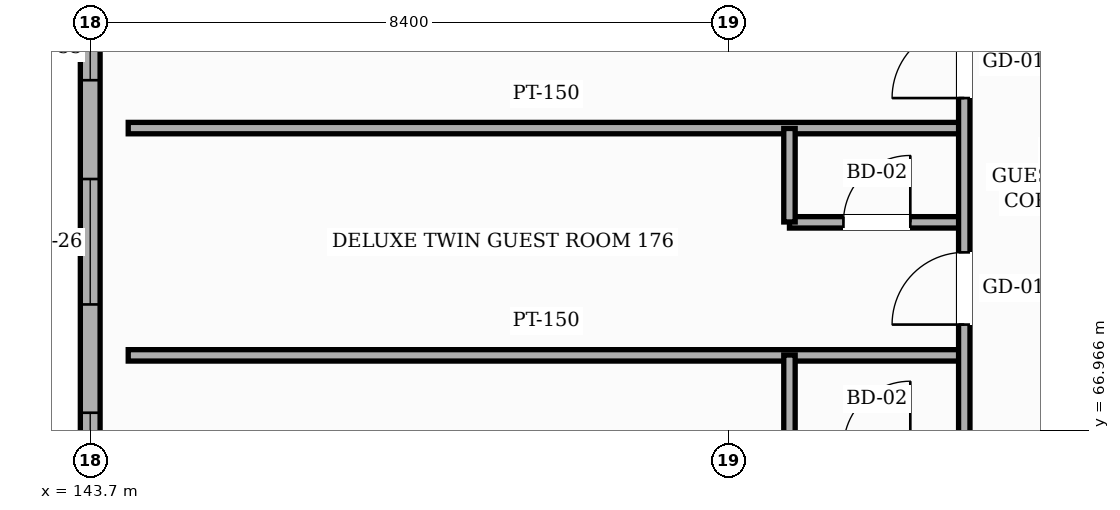
"""IFC4 building model, lengths in metres.
Left out: names, types, materials, properties, quantities, classifications, styles, units other than length and angle.
Written with IfcOpenShell. Run it as: python <this file> out.ifc"""

import sys

from ifc_helpers import new_model, si_unit, direction, frame, frame_2d, origin, place, context, subcontext, project, spatial, rectangle, extrude, element, fill, save


model = new_model("IFC4")
c1 = context("Model", 3, precision=1e-05, world=origin(), true_north=direction((0.0, 1.0)))
c2 = subcontext(c1, "Body", "Model", "MODEL_VIEW")
j1 = project(units=[si_unit("LENGTHUNIT", "METRE"), si_unit("PLANEANGLEUNIT", "RADIAN")], contexts=[c1])
p1 = place(None, origin())
s1 = spatial("IfcSite", under=j1, at=p1, CompositionType="ELEMENT")
p2 = place(p1, origin())
s2 = spatial("IfcBuilding", under=s1, at=p2, CompositionType="ELEMENT")
p3 = place(p2, frame((0.0, 0.0, 31.8)))
s3 = spatial("IfcBuildingStorey", under=s2, at=p3, CompositionType="ELEMENT", Elevation=31.8)
p4 = place(p3, frame((143.7, 64.75, 0.0), z_axis=(0.0, 0.0, 1.0), x_axis=(0.0, 1.0, 0.0)))
e1 = element("IfcWall", 1, at=p4, inside=s3, PredefinedType="SOLIDWALL", context=c2, shape_type="SweptSolid", body=[
    extrude(rectangle(XDim=8.3, YDim=0.26, at=frame_2d((4.15, 0.0))), origin(), (0.0, 0.0, 1.0), 2.655),
])
p5 = place(p4, frame((0.995, 0.0, 0.85)))
e2 = element("IfcOpeningElement", 2, at=p5, cuts=e1, PredefinedType="OPENING", context=c2, shape_type="SweptSolid", body=[
    extrude(rectangle(XDim=1.45, YDim=1.35, at=frame_2d((0.725, 0.675))), frame((0.0, 0.14, 0.0), z_axis=(0.0, -1.0, 0.0), x_axis=(1.0, 0.0, 0.0)), (0.0, 0.0, 1.0), 0.28),
])
p6 = place(p4, frame((3.87, 0.0, 0.85)))
e3 = element("IfcOpeningElement", 3, at=p6, cuts=e1, PredefinedType="OPENING", context=c2, shape_type="SweptSolid", body=[
    extrude(rectangle(XDim=1.65, YDim=1.35, at=frame_2d((0.825, 0.675))), frame((0.0, 0.14, 0.0), z_axis=(0.0, -1.0, 0.0), x_axis=(1.0, 0.0, 0.0)), (0.0, 0.0, 1.0), 0.28),
])
p7 = place(p4, frame((6.82, 0.0, 0.85)))
e4 = element("IfcOpeningElement", 4, at=p7, cuts=e1, PredefinedType="OPENING", context=c2, shape_type="SweptSolid", body=[
    extrude(rectangle(XDim=0.85, YDim=1.35, at=frame_2d((0.425, 0.675))), frame((0.0, 0.14, 0.0), z_axis=(0.0, -1.0, 0.0), x_axis=(1.0, 0.0, 0.0)), (0.0, 0.0, 1.0), 0.28),
])
p8 = place(p3, frame((144.2, 67.95, 0.0), z_axis=(0.0, 0.0, 1.0), x_axis=(1.0, 0.0, 0.0)))
e5 = element("IfcWall", 5, at=p8, inside=s3, PredefinedType="PARTITIONING", context=c2, shape_type="SweptSolid", body=[
    extrude(rectangle(XDim=11.0, YDim=0.15, at=frame_2d((5.5, 0.0))), origin(), (0.0, 0.0, 1.0), 3.365),
])
p9 = place(p3, frame((152.9, 69.7, 0.0), z_axis=(0.0, 0.0, 1.0), x_axis=(1.0, 0.0, 0.0)))
e6 = element("IfcWall", 6, at=p9, inside=s3, PredefinedType="PARTITIONING", context=c2, shape_type="SweptSolid", body=[
    extrude(rectangle(XDim=2.3, YDim=0.15, at=frame_2d((1.15, 0.0))), origin(), (0.0, 0.0, 1.0), 3.365),
])
p10 = place(p9, frame((0.71, 0.0, 0.0)))
e7 = element("IfcOpeningElement", 7, at=p10, cuts=e6, PredefinedType="OPENING", context=c2, shape_type="SweptSolid", body=[
    extrude(rectangle(XDim=0.88, YDim=2.12, at=frame_2d((0.44, 1.06))), frame((0.0, 0.085, 0.0), z_axis=(0.0, -1.0, 0.0), x_axis=(1.0, 0.0, 0.0)), (0.0, 0.0, 1.0), 0.17),
])
p11 = place(p3, frame((144.2, 70.94, 0.0), z_axis=(0.0, 0.0, 1.0), x_axis=(1.0, 0.0, 0.0)))
e8 = element("IfcWall", 8, at=p11, inside=s3, PredefinedType="PARTITIONING", context=c2, shape_type="SweptSolid", body=[
    extrude(rectangle(XDim=11.0, YDim=0.15, at=frame_2d((5.5, 0.0))), origin(), (0.0, 0.0, 1.0), 3.365),
])
p12 = place(p3, frame((152.9, 66.73, 0.0), z_axis=(0.0, 0.0, 1.0), x_axis=(0.0, 1.0, 0.0)))
e9 = element("IfcWall", 9, at=p12, inside=s3, PredefinedType="PARTITIONING", context=c2, shape_type="SweptSolid", body=[
    extrude(rectangle(XDim=1.225, YDim=0.15, at=frame_2d((0.613, 0.0))), origin(), (0.0, 0.0, 1.0), 3.365),
])
p13 = place(p3, frame((152.9, 69.705, 0.0), z_axis=(0.0, 0.0, 1.0), x_axis=(0.0, 1.0, 0.0)))
e10 = element("IfcWall", 10, at=p13, inside=s3, PredefinedType="PARTITIONING", context=c2, shape_type="SweptSolid", body=[
    extrude(rectangle(XDim=1.23, YDim=0.15, at=frame_2d((0.615, 0.0))), origin(), (0.0, 0.0, 1.0), 3.365),
])
p14 = place(p3, frame((155.2, 62.0, 0.0), z_axis=(0.0, 0.0, 1.0), x_axis=(0.0, 1.0, 0.0)))
e11 = element("IfcWall", 11, at=p14, inside=s3, PredefinedType="PARTITIONING", context=c2, shape_type="SweptSolid", body=[
    extrude(rectangle(XDim=34.4, YDim=0.15, at=frame_2d((17.2, 0.0))), origin(), (0.0, 0.0, 1.0), 3.365),
])
p15 = place(p14, frame((29.775, 0.0, 0.0)))
e12 = element("IfcOpeningElement", 12, at=p15, cuts=e11, PredefinedType="OPENING", context=c2, shape_type="SweptSolid", body=[
    extrude(rectangle(XDim=1.65, YDim=2.35, at=frame_2d((0.825, 1.175))), frame((0.0, 0.085, 0.0), z_axis=(0.0, -1.0, 0.0), x_axis=(1.0, 0.0, 0.0)), (0.0, 0.0, 1.0), 0.17),
])
p16 = place(p14, frame((0.4, 0.0, 0.0)))
e13 = element("IfcOpeningElement", 13, at=p16, cuts=e11, PredefinedType="OPENING", context=c2, shape_type="SweptSolid", body=[
    extrude(rectangle(XDim=0.95, YDim=2.15, at=frame_2d((0.475, 1.075))), frame((0.0, 0.085, 0.0), z_axis=(0.0, -1.0, 0.0), x_axis=(1.0, 0.0, 0.0)), (0.0, 0.0, 1.0), 0.17),
])
p17 = place(p14, frame((3.38, 0.0, 0.0)))
e14 = element("IfcOpeningElement", 14, at=p17, cuts=e11, PredefinedType="OPENING", context=c2, shape_type="SweptSolid", body=[
    extrude(rectangle(XDim=0.95, YDim=2.15, at=frame_2d((0.475, 1.075))), frame((0.0, 0.085, 0.0), z_axis=(0.0, -1.0, 0.0), x_axis=(1.0, 0.0, 0.0)), (0.0, 0.0, 1.0), 0.17),
])
p18 = place(p14, frame((6.355, 0.0, 0.0)))
e15 = element("IfcOpeningElement", 15, at=p18, cuts=e11, PredefinedType="OPENING", context=c2, shape_type="SweptSolid", body=[
    extrude(rectangle(XDim=0.95, YDim=2.15, at=frame_2d((0.475, 1.075))), frame((0.0, 0.085, 0.0), z_axis=(0.0, -1.0, 0.0), x_axis=(1.0, 0.0, 0.0)), (0.0, 0.0, 1.0), 0.17),
])
p19 = place(p14, frame((9.335, 0.0, 0.0)))
e16 = element("IfcOpeningElement", 16, at=p19, cuts=e11, PredefinedType="OPENING", context=c2, shape_type="SweptSolid", body=[
    extrude(rectangle(XDim=0.95, YDim=2.15, at=frame_2d((0.475, 1.075))), frame((0.0, 0.085, 0.0), z_axis=(0.0, -1.0, 0.0), x_axis=(1.0, 0.0, 0.0)), (0.0, 0.0, 1.0), 0.17),
])
p20 = place(p14, frame((12.31, 0.0, 0.0)))
e17 = element("IfcOpeningElement", 17, at=p20, cuts=e11, PredefinedType="OPENING", context=c2, shape_type="SweptSolid", body=[
    extrude(rectangle(XDim=0.95, YDim=2.15, at=frame_2d((0.475, 1.075))), frame((0.0, 0.085, 0.0), z_axis=(0.0, -1.0, 0.0), x_axis=(1.0, 0.0, 0.0)), (0.0, 0.0, 1.0), 0.17),
])
p21 = place(p14, frame((15.29, 0.0, 0.0)))
e18 = element("IfcOpeningElement", 18, at=p21, cuts=e11, PredefinedType="OPENING", context=c2, shape_type="SweptSolid", body=[
    extrude(rectangle(XDim=0.95, YDim=2.15, at=frame_2d((0.475, 1.075))), frame((0.0, 0.085, 0.0), z_axis=(0.0, -1.0, 0.0), x_axis=(1.0, 0.0, 0.0)), (0.0, 0.0, 1.0), 0.17),
])
p22 = place(p14, frame((18.265, 0.0, 0.0)))
e19 = element("IfcOpeningElement", 19, at=p22, cuts=e11, PredefinedType="OPENING", context=c2, shape_type="SweptSolid", body=[
    extrude(rectangle(XDim=0.95, YDim=2.15, at=frame_2d((0.475, 1.075))), frame((0.0, 0.085, 0.0), z_axis=(0.0, -1.0, 0.0), x_axis=(1.0, 0.0, 0.0)), (0.0, 0.0, 1.0), 0.17),
])
p23 = place(p14, frame((21.245, 0.0, 0.0)))
e20 = element("IfcOpeningElement", 20, at=p23, cuts=e11, PredefinedType="OPENING", context=c2, shape_type="SweptSolid", body=[
    extrude(rectangle(XDim=0.95, YDim=2.15, at=frame_2d((0.475, 1.075))), frame((0.0, 0.085, 0.0), z_axis=(0.0, -1.0, 0.0), x_axis=(1.0, 0.0, 0.0)), (0.0, 0.0, 1.0), 0.17),
])
p24 = place(p14, frame((24.22, 0.0, 0.0)))
e21 = element("IfcOpeningElement", 21, at=p24, cuts=e11, PredefinedType="OPENING", context=c2, shape_type="SweptSolid", body=[
    extrude(rectangle(XDim=0.95, YDim=2.15, at=frame_2d((0.475, 1.075))), frame((0.0, 0.085, 0.0), z_axis=(0.0, -1.0, 0.0), x_axis=(1.0, 0.0, 0.0)), (0.0, 0.0, 1.0), 0.17),
])
p25 = place(p5, origin())
e22 = element("IfcWindow", 22, at=p25, inside=s3, PartitioningType="SINGLE_PANEL", PredefinedType="WINDOW", context=c2, shape_type="SweptSolid", body=[
    extrude(rectangle(XDim=1.45, YDim=1.35, at=frame_2d((0.725, 0.675))), frame((0.0, 0.03, 0.0), z_axis=(0.0, -1.0, 0.0), x_axis=(1.0, 0.0, 0.0)), (0.0, 0.0, 1.0), 0.06),
])
fill(e2, e22)
p26 = place(p6, origin())
e23 = element("IfcWindow", 23, at=p26, inside=s3, PartitioningType="SINGLE_PANEL", PredefinedType="WINDOW", context=c2, shape_type="SweptSolid", body=[
    extrude(rectangle(XDim=1.65, YDim=1.35, at=frame_2d((0.825, 0.675))), frame((0.0, 0.03, 0.0), z_axis=(0.0, -1.0, 0.0), x_axis=(1.0, 0.0, 0.0)), (0.0, 0.0, 1.0), 0.06),
])
fill(e3, e23)
p27 = place(p7, origin())
e24 = element("IfcWindow", 24, at=p27, inside=s3, PartitioningType="SINGLE_PANEL", PredefinedType="WINDOW", context=c2, shape_type="SweptSolid", body=[
    extrude(rectangle(XDim=0.85, YDim=1.35, at=frame_2d((0.425, 0.675))), frame((0.0, 0.03, 0.0), z_axis=(0.0, -1.0, 0.0), x_axis=(1.0, 0.0, 0.0)), (0.0, 0.0, 1.0), 0.06),
])
fill(e4, e24)
p28 = place(p18, origin())
e25 = element("IfcDoor", 25, at=p28, inside=s3, OperationType="SINGLE_SWING_LEFT", PredefinedType="DOOR", context=c2, shape_type="SweptSolid", body=[
    extrude(rectangle(XDim=0.95, YDim=2.15, at=frame_2d((0.475, 1.075))), frame((0.0, 0.025, 0.0), z_axis=(0.0, -1.0, 0.0), x_axis=(1.0, 0.0, 0.0)), (0.0, 0.0, 1.0), 0.05),
])
fill(e15, e25)
p29 = place(p10, origin())
e26 = element("IfcDoor", 26, at=p29, inside=s3, OperationType="SINGLE_SWING_RIGHT", PredefinedType="DOOR", context=c2, shape_type="SweptSolid", body=[
    extrude(rectangle(XDim=0.88, YDim=2.12, at=frame_2d((0.44, 1.06))), frame((0.0, 0.025, 0.0), z_axis=(0.0, -1.0, 0.0), x_axis=(1.0, 0.0, 0.0)), (0.0, 0.0, 1.0), 0.05),
])
fill(e7, e26)
p30 = place(p19, origin())
e27 = element("IfcDoor", 27, at=p30, inside=s3, OperationType="SINGLE_SWING_LEFT", PredefinedType="DOOR", context=c2, shape_type="SweptSolid", body=[
    extrude(rectangle(XDim=0.95, YDim=2.15, at=frame_2d((0.475, 1.075))), frame((0.0, 0.025, 0.0), z_axis=(0.0, -1.0, 0.0), x_axis=(1.0, 0.0, 0.0)), (0.0, 0.0, 1.0), 0.05),
])
fill(e16, e27)
save(model, sys.argv[1])
